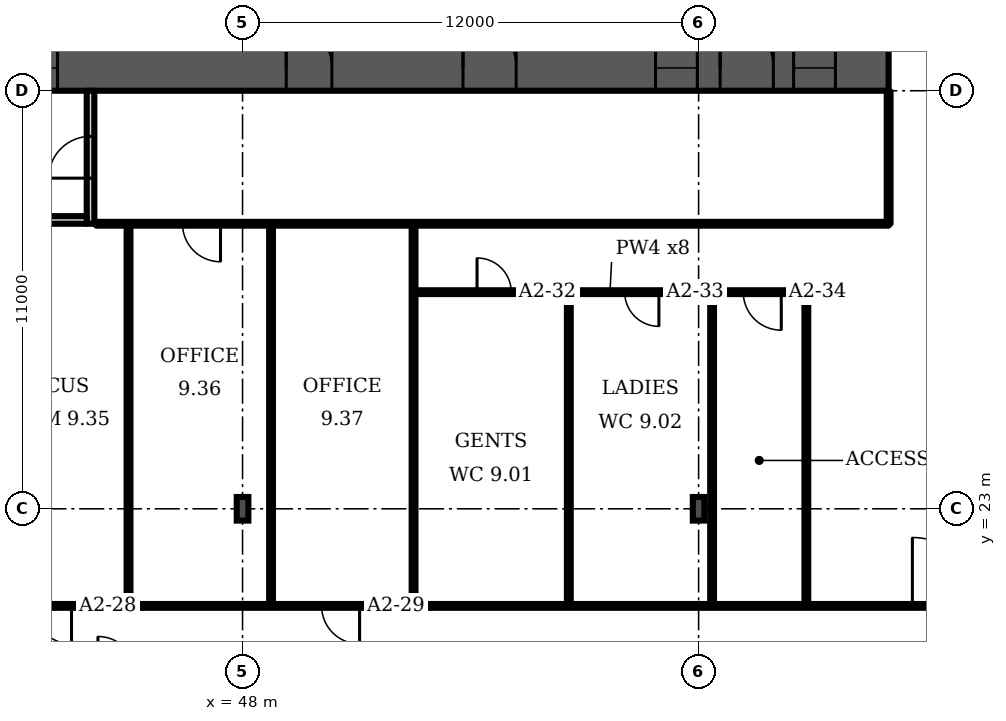
"""IFC4 building model, lengths in metres.
Left out: names, types, materials, properties, quantities, classifications, styles, units other than length and angle.
Written with IfcOpenShell. Run it as: python <this file> out.ifc"""

import sys

from ifc_helpers import new_model, si_unit, direction, frame, frame_2d, origin, origin_2d, place, context, subcontext, project, spatial, rectangle, i_section, extrude, element, fill, save


model = new_model("IFC4")
c1 = context("Model", 3, precision=1e-05, world=origin(), true_north=direction((0.0, 1.0)))
c2 = subcontext(c1, "Body", "Model", "MODEL_VIEW")
j1 = project(units=[si_unit("LENGTHUNIT", "METRE"), si_unit("PLANEANGLEUNIT", "RADIAN")], contexts=[c1])
p1 = place(None, origin())
s1 = spatial("IfcSite", under=j1, at=p1, CompositionType="ELEMENT")
p2 = place(p1, origin())
s2 = spatial("IfcBuilding", under=s1, at=p2, CompositionType="ELEMENT")
p3 = place(p2, frame((0.0, 0.0, 52.3)))
s3 = spatial("IfcBuildingStorey", under=s2, at=p3, CompositionType="ELEMENT", Elevation=52.3)
p4 = place(p3, frame((9.0, 34.6, 0.0), z_axis=(0.0, 0.0, 1.0), x_axis=(1.0, 0.0, 0.0)))
e1 = element("IfcWall", 1, at=p4, inside=s3, PredefinedType="SHEAR", context=c2, shape_type="SweptSolid", body=[
    extrude(rectangle(XDim=56.0, YDim=1.2, at=frame_2d((28.0, 0.0))), origin(), (0.0, 0.0, 1.0), 3.6),
])
p5 = place(p4, frame((2.0, 0.0, 0.0)))
e2 = element("IfcOpeningElement", 2, at=p5, cuts=e1, PredefinedType="OPENING", context=c2, shape_type="SweptSolid", body=[
    extrude(rectangle(XDim=1.0, YDim=2.1, at=frame_2d((0.5, 1.05))), frame((0.0, 0.61, 0.0), z_axis=(0.0, -1.0, 0.0), x_axis=(1.0, 0.0, 0.0)), (0.0, 0.0, 1.0), 1.22),
])
p6 = place(p4, frame((4.6, 0.0, 0.0)))
e3 = element("IfcOpeningElement", 3, at=p6, cuts=e1, PredefinedType="OPENING", context=c2, shape_type="SweptSolid", body=[
    extrude(rectangle(XDim=1.0, YDim=2.1, at=frame_2d((0.5, 1.05))), frame((0.0, 0.61, 0.0), z_axis=(0.0, -1.0, 0.0), x_axis=(1.0, 0.0, 0.0)), (0.0, 0.0, 1.0), 1.22),
])
p7 = place(p4, frame((7.867, 0.0, 0.0)))
e4 = element("IfcOpeningElement", 4, at=p7, cuts=e1, PredefinedType="OPENING", context=c2, shape_type="SweptSolid", body=[
    extrude(rectangle(XDim=1.1, YDim=2.1, at=frame_2d((0.55, 1.05))), frame((0.0, 0.61, 0.0), z_axis=(0.0, -1.0, 0.0), x_axis=(1.0, 0.0, 0.0)), (0.0, 0.0, 1.0), 1.22),
])
p8 = place(p4, frame((12.033, 0.0, 0.0)))
e5 = element("IfcOpeningElement", 5, at=p8, cuts=e1, PredefinedType="OPENING", context=c2, shape_type="SweptSolid", body=[
    extrude(rectangle(XDim=1.1, YDim=2.1, at=frame_2d((0.55, 1.05))), frame((0.0, 0.61, 0.0), z_axis=(0.0, -1.0, 0.0), x_axis=(1.0, 0.0, 0.0)), (0.0, 0.0, 1.0), 1.22),
])
p9 = place(p4, frame((9.8, 0.0, 0.0)))
e6 = element("IfcOpeningElement", 6, at=p9, cuts=e1, PredefinedType="OPENING", context=c2, shape_type="SweptSolid", body=[
    extrude(rectangle(XDim=1.4, YDim=2.1, at=frame_2d((0.7, 1.05))), frame((0.0, 0.61, 0.0), z_axis=(0.0, -1.0, 0.0), x_axis=(1.0, 0.0, 0.0)), (0.0, 0.0, 1.0), 1.22),
])
p10 = place(p4, frame((14.65, 0.0, 0.0)))
e7 = element("IfcOpeningElement", 7, at=p10, cuts=e1, PredefinedType="OPENING", context=c2, shape_type="SweptSolid", body=[
    extrude(rectangle(XDim=1.2, YDim=2.1, at=frame_2d((0.6, 1.05))), frame((0.0, 0.61, 0.0), z_axis=(0.0, -1.0, 0.0), x_axis=(1.0, 0.0, 0.0)), (0.0, 0.0, 1.0), 1.22),
])
p11 = place(p4, frame((21.867, 0.0, 0.0)))
e8 = element("IfcOpeningElement", 8, at=p11, cuts=e1, PredefinedType="OPENING", context=c2, shape_type="SweptSolid", body=[
    extrude(rectangle(XDim=1.1, YDim=2.1, at=frame_2d((0.55, 1.05))), frame((0.0, 0.61, 0.0), z_axis=(0.0, -1.0, 0.0), x_axis=(1.0, 0.0, 0.0)), (0.0, 0.0, 1.0), 1.22),
])
p12 = place(p4, frame((26.033, 0.0, 0.0)))
e9 = element("IfcOpeningElement", 9, at=p12, cuts=e1, PredefinedType="OPENING", context=c2, shape_type="SweptSolid", body=[
    extrude(rectangle(XDim=1.1, YDim=2.1, at=frame_2d((0.55, 1.05))), frame((0.0, 0.61, 0.0), z_axis=(0.0, -1.0, 0.0), x_axis=(1.0, 0.0, 0.0)), (0.0, 0.0, 1.0), 1.22),
])
p13 = place(p4, frame((23.8, 0.0, 0.0)))
e10 = element("IfcOpeningElement", 10, at=p13, cuts=e1, PredefinedType="OPENING", context=c2, shape_type="SweptSolid", body=[
    extrude(rectangle(XDim=1.4, YDim=2.1, at=frame_2d((0.7, 1.05))), frame((0.0, 0.61, 0.0), z_axis=(0.0, -1.0, 0.0), x_axis=(1.0, 0.0, 0.0)), (0.0, 0.0, 1.0), 1.22),
])
p14 = place(p4, frame((28.867, 0.0, 0.0)))
e11 = element("IfcOpeningElement", 11, at=p14, cuts=e1, PredefinedType="OPENING", context=c2, shape_type="SweptSolid", body=[
    extrude(rectangle(XDim=1.1, YDim=2.1, at=frame_2d((0.55, 1.05))), frame((0.0, 0.61, 0.0), z_axis=(0.0, -1.0, 0.0), x_axis=(1.0, 0.0, 0.0)), (0.0, 0.0, 1.0), 1.22),
])
p15 = place(p4, frame((33.033, 0.0, 0.0)))
e12 = element("IfcOpeningElement", 12, at=p15, cuts=e1, PredefinedType="OPENING", context=c2, shape_type="SweptSolid", body=[
    extrude(rectangle(XDim=1.1, YDim=2.1, at=frame_2d((0.55, 1.05))), frame((0.0, 0.61, 0.0), z_axis=(0.0, -1.0, 0.0), x_axis=(1.0, 0.0, 0.0)), (0.0, 0.0, 1.0), 1.22),
])
p16 = place(p4, frame((40.15, 0.0, 0.0)))
e13 = element("IfcOpeningElement", 13, at=p16, cuts=e1, PredefinedType="OPENING", context=c2, shape_type="SweptSolid", body=[
    extrude(rectangle(XDim=1.2, YDim=2.1, at=frame_2d((0.6, 1.05))), frame((0.0, 0.61, 0.0), z_axis=(0.0, -1.0, 0.0), x_axis=(1.0, 0.0, 0.0)), (0.0, 0.0, 1.0), 1.22),
])
p17 = place(p4, frame((44.8, 0.0, 0.0)))
e14 = element("IfcOpeningElement", 14, at=p17, cuts=e1, PredefinedType="OPENING", context=c2, shape_type="SweptSolid", body=[
    extrude(rectangle(XDim=1.4, YDim=2.1, at=frame_2d((0.7, 1.05))), frame((0.0, 0.61, 0.0), z_axis=(0.0, -1.0, 0.0), x_axis=(1.0, 0.0, 0.0)), (0.0, 0.0, 1.0), 1.22),
])
p18 = place(p4, frame((49.867, 0.0, 0.0)))
e15 = element("IfcOpeningElement", 15, at=p18, cuts=e1, PredefinedType="OPENING", context=c2, shape_type="SweptSolid", body=[
    extrude(rectangle(XDim=1.1, YDim=2.1, at=frame_2d((0.55, 1.05))), frame((0.0, 0.61, 0.0), z_axis=(0.0, -1.0, 0.0), x_axis=(1.0, 0.0, 0.0)), (0.0, 0.0, 1.0), 1.22),
])
p19 = place(p4, frame((53.5, 0.0, 0.0)))
e16 = element("IfcOpeningElement", 16, at=p19, cuts=e1, PredefinedType="OPENING", context=c2, shape_type="SweptSolid", body=[
    extrude(rectangle(XDim=1.1, YDim=2.1, at=frame_2d((0.55, 1.05))), frame((0.0, 0.61, 0.0), z_axis=(0.0, -1.0, 0.0), x_axis=(1.0, 0.0, 0.0)), (0.0, 0.0, 1.0), 1.22),
])
p20 = place(p4, frame((51.567, 0.0, 0.0)))
e17 = element("IfcOpeningElement", 17, at=p20, cuts=e1, PredefinedType="OPENING", context=c2, shape_type="SweptSolid", body=[
    extrude(rectangle(XDim=1.4, YDim=2.1, at=frame_2d((0.7, 1.05))), frame((0.0, 0.61, 0.0), z_axis=(0.0, -1.0, 0.0), x_axis=(1.0, 0.0, 0.0)), (0.0, 0.0, 1.0), 1.22),
])
for number, where, z_axis, x_axis in (
    (18, (48.0, 23.0, 0.0), (0.0, 0.0, 1.0), (1.0, 0.0, 0.0)),
    (19, (60.0, 23.0, 0.0), (0.0, 0.0, 1.0), (1.0, 0.0, 0.0)),
):
    element("IfcColumn", number, at=place(p3, frame(where, z_axis=z_axis, x_axis=x_axis)), inside=s3, PredefinedType="COLUMN", context=c2, shape_type="SweptSolid", body=[
        extrude(i_section(OverallWidth=0.305, OverallDepth=0.62, WebThickness=0.021, FlangeThickness=0.04, FilletRadius=0.027, at=origin_2d()), origin(), (0.0, 0.0, 1.0), 3.6),
    ])
p21 = place(p3, frame((44.0, 30.5, 0.0), z_axis=(0.0, 0.0, 1.0), x_axis=(0.0, 1.0, 0.0)))
e20 = element("IfcWall", 20, at=p21, inside=s3, PredefinedType="PARTITIONING", context=c2, shape_type="SweptSolid", body=[
    extrude(rectangle(XDim=3.5, YDim=0.2, at=frame_2d((1.75, 0.0))), origin(), (0.0, 0.0, 1.0), 3.2),
])
p22 = place(p21, frame((1.2, 0.0, 0.0)))
e21 = element("IfcOpeningElement", 21, at=p22, cuts=e20, PredefinedType="OPENING", context=c2, shape_type="SweptSolid", body=[
    extrude(rectangle(XDim=1.1, YDim=2.1, at=frame_2d((0.55, 1.05))), frame((0.0, 0.11, 0.0), z_axis=(0.0, -1.0, 0.0), x_axis=(1.0, 0.0, 0.0)), (0.0, 0.0, 1.0), 0.22),
])
p23 = place(p3, frame((41.1, 30.6, 0.0), z_axis=(0.0, 0.0, 1.0), x_axis=(1.0, 0.0, 0.0)))
e22 = element("IfcWall", 22, at=p23, inside=s3, PredefinedType="PARTITIONING", context=c2, shape_type="SweptSolid", body=[
    extrude(rectangle(XDim=2.8, YDim=0.2, at=frame_2d((1.4, 0.0))), origin(), (0.0, 0.0, 1.0), 3.2),
])
p24 = place(p3, frame((11.505, 20.445, 0.0), z_axis=(0.0, 0.0, 1.0), x_axis=(1.0, 0.0, 0.0)))
e23 = element("IfcWall", 23, at=p24, inside=s3, PredefinedType="PARTITIONING", context=c2, shape_type="SweptSolid", body=[
    extrude(rectangle(XDim=58.82, YDim=0.1, at=frame_2d((29.41, 0.0))), origin(), (0.0, 0.0, 1.0), 3.2),
])
p25 = place(p24, frame((0.21, 0.0, 0.0)))
e24 = element("IfcOpeningElement", 24, at=p25, cuts=e23, PredefinedType="OPENING", context=c2, shape_type="SweptSolid", body=[
    extrude(rectangle(XDim=1.0, YDim=2.1, at=frame_2d((0.5, 1.05))), frame((0.0, 0.06, 0.0), z_axis=(0.0, -1.0, 0.0), x_axis=(1.0, 0.0, 0.0)), (0.0, 0.0, 1.0), 0.12),
])
p26 = place(p24, frame((8.33, 0.0, 0.0)))
e25 = element("IfcOpeningElement", 25, at=p26, cuts=e23, PredefinedType="OPENING", context=c2, shape_type="SweptSolid", body=[
    extrude(rectangle(XDim=1.0, YDim=2.1, at=frame_2d((0.5, 1.05))), frame((0.0, 0.06, 0.0), z_axis=(0.0, -1.0, 0.0), x_axis=(1.0, 0.0, 0.0)), (0.0, 0.0, 1.0), 0.12),
])
p27 = place(p24, frame((22.795, 0.0, 0.0)))
e26 = element("IfcOpeningElement", 26, at=p27, cuts=e23, PredefinedType="OPENING", context=c2, shape_type="SweptSolid", body=[
    extrude(rectangle(XDim=1.0, YDim=2.1, at=frame_2d((0.5, 1.05))), frame((0.0, 0.06, 0.0), z_axis=(0.0, -1.0, 0.0), x_axis=(1.0, 0.0, 0.0)), (0.0, 0.0, 1.0), 0.12),
])
p28 = place(p24, frame((26.995, 0.0, 0.0)))
e27 = element("IfcOpeningElement", 27, at=p28, cuts=e23, PredefinedType="OPENING", context=c2, shape_type="SweptSolid", body=[
    extrude(rectangle(XDim=1.0, YDim=2.1, at=frame_2d((0.5, 1.05))), frame((0.0, 0.06, 0.0), z_axis=(0.0, -1.0, 0.0), x_axis=(1.0, 0.0, 0.0)), (0.0, 0.0, 1.0), 0.12),
])
p29 = place(p24, frame((30.995, 0.0, 0.0)))
e28 = element("IfcOpeningElement", 28, at=p29, cuts=e23, PredefinedType="OPENING", context=c2, shape_type="SweptSolid", body=[
    extrude(rectangle(XDim=1.0, YDim=2.1, at=frame_2d((0.5, 1.05))), frame((0.0, 0.06, 0.0), z_axis=(0.0, -1.0, 0.0), x_axis=(1.0, 0.0, 0.0)), (0.0, 0.0, 1.0), 0.12),
])
p30 = place(p24, frame((38.575, 0.0, 0.0)))
e29 = element("IfcOpeningElement", 29, at=p30, cuts=e23, PredefinedType="OPENING", context=c2, shape_type="SweptSolid", body=[
    extrude(rectangle(XDim=1.0, YDim=2.1, at=frame_2d((0.5, 1.05))), frame((0.0, 0.06, 0.0), z_axis=(0.0, -1.0, 0.0), x_axis=(1.0, 0.0, 0.0)), (0.0, 0.0, 1.0), 0.12),
])
p31 = place(p24, frame((54.12, 0.0, 0.0)))
e30 = element("IfcOpeningElement", 30, at=p31, cuts=e23, PredefinedType="OPENING", context=c2, shape_type="SweptSolid", body=[
    extrude(rectangle(XDim=1.8, YDim=2.1, at=frame_2d((0.9, 1.05))), frame((0.0, 0.06, 0.0), z_axis=(0.0, -1.0, 0.0), x_axis=(1.0, 0.0, 0.0)), (0.0, 0.0, 1.0), 0.12),
])
for number, where, z_axis, x_axis in (
    (31, (45.0, 20.445, 0.0), (0.0, 0.0, 1.0), (0.0, 1.0, 0.0)),
    (32, (48.75, 20.445, 0.0), (0.0, 0.0, 1.0), (0.0, 1.0, 0.0)),
):
    element("IfcWall", number, at=place(p3, frame(where, z_axis=z_axis, x_axis=x_axis)), inside=s3, PredefinedType="PARTITIONING", context=c2, shape_type="SweptSolid", body=[
        extrude(rectangle(XDim=10.055, YDim=0.1, at=frame_2d((5.027, 0.0))), origin(), (0.0, 0.0, 1.0), 3.2),
    ])
p32 = place(p3, frame((52.5, 20.445, 0.0), z_axis=(0.0, 0.0, 1.0), x_axis=(0.0, 1.0, 0.0)))
e33 = element("IfcWall", 33, at=p32, inside=s3, PredefinedType="PARTITIONING", context=c2, shape_type="SweptSolid", body=[
    extrude(rectangle(XDim=10.045, YDim=0.1, at=frame_2d((5.022, 0.0))), origin(), (0.0, 0.0, 1.0), 3.2),
])
p33 = place(p3, frame((52.5, 28.7, 0.0), z_axis=(0.0, 0.0, 1.0), x_axis=(1.0, 0.0, 0.0)))
e34 = element("IfcWall", 34, at=p33, inside=s3, PredefinedType="PARTITIONING", context=c2, shape_type="SweptSolid", body=[
    extrude(rectangle(XDim=10.335, YDim=0.1, at=frame_2d((5.167, 0.0))), origin(), (0.0, 0.0, 1.0), 3.2),
])
p34 = place(p33, frame((1.67, 0.0, 0.0)))
e35 = element("IfcOpeningElement", 35, at=p34, cuts=e34, PredefinedType="OPENING", context=c2, shape_type="SweptSolid", body=[
    extrude(rectangle(XDim=0.9, YDim=2.1, at=frame_2d((0.45, 1.05))), frame((0.0, 0.06, 0.0), z_axis=(0.0, -1.0, 0.0), x_axis=(1.0, 0.0, 0.0)), (0.0, 0.0, 1.0), 0.12),
])
p35 = place(p33, frame((5.555, 0.0, 0.0)))
e36 = element("IfcOpeningElement", 36, at=p35, cuts=e34, PredefinedType="OPENING", context=c2, shape_type="SweptSolid", body=[
    extrude(rectangle(XDim=0.9, YDim=2.1, at=frame_2d((0.45, 1.05))), frame((0.0, 0.06, 0.0), z_axis=(0.0, -1.0, 0.0), x_axis=(1.0, 0.0, 0.0)), (0.0, 0.0, 1.0), 0.12),
])
p36 = place(p33, frame((8.675, 0.0, 0.0)))
e37 = element("IfcOpeningElement", 37, at=p36, cuts=e34, PredefinedType="OPENING", context=c2, shape_type="SweptSolid", body=[
    extrude(rectangle(XDim=1.0, YDim=2.1, at=frame_2d((0.5, 1.05))), frame((0.0, 0.06, 0.0), z_axis=(0.0, -1.0, 0.0), x_axis=(1.0, 0.0, 0.0)), (0.0, 0.0, 1.0), 0.12),
])
for number, where, z_axis, x_axis in (
    (38, (56.585, 20.445, 0.0), (0.0, 0.0, 1.0), (0.0, 1.0, 0.0)),
    (39, (60.355, 20.445, 0.0), (0.0, 0.0, 1.0), (0.0, 1.0, 0.0)),
    (40, (62.835, 20.445, 0.0), (0.0, 0.0, 1.0), (0.0, 1.0, 0.0)),
):
    element("IfcWall", number, at=place(p3, frame(where, z_axis=z_axis, x_axis=x_axis)), inside=s3, PredefinedType="PARTITIONING", context=c2, shape_type="SweptSolid", body=[
        extrude(rectangle(XDim=8.255, YDim=0.1, at=frame_2d((4.127, 0.0))), origin(), (0.0, 0.0, 1.0), 3.2),
    ])
p37 = place(p3, frame((65.0, 30.5, 0.0), z_axis=(0.0, 0.0, 1.0), x_axis=(0.0, 1.0, 0.0)))
e41 = element("IfcWall", 41, at=p37, inside=s3, PredefinedType="PARTITIONING", context=c2, shape_type="SweptSolid", body=[
    extrude(rectangle(XDim=3.48, YDim=0.1, at=frame_2d((1.74, 0.0))), origin(), (0.0, 0.0, 1.0), 3.2),
])
p38 = place(p3, frame((44.15, 30.5, 0.0), z_axis=(0.0, 0.0, 1.0), x_axis=(1.0, 0.0, 0.0)))
e42 = element("IfcWall", 42, at=p38, inside=s3, PredefinedType="PARTITIONING", context=c2, shape_type="SweptSolid", body=[
    extrude(rectangle(XDim=20.85, YDim=0.1, at=frame_2d((10.425, 0.0))), origin(), (0.0, 0.0, 1.0), 3.2),
])
p39 = place(p38, frame((2.27, 0.0, 0.0)))
e43 = element("IfcOpeningElement", 43, at=p39, cuts=e42, PredefinedType="OPENING", context=c2, shape_type="SweptSolid", body=[
    extrude(rectangle(XDim=1.0, YDim=2.1, at=frame_2d((0.5, 1.05))), frame((0.0, 0.06, 0.0), z_axis=(0.0, -1.0, 0.0), x_axis=(1.0, 0.0, 0.0)), (0.0, 0.0, 1.0), 0.12),
])
p40 = place(p15, origin())
e44 = element("IfcDoor", 44, at=p40, inside=s3, OperationType="DOUBLE_DOOR_SLIDING", PredefinedType="DOOR", context=c2, shape_type="SweptSolid", body=[
    extrude(rectangle(XDim=1.1, YDim=2.1, at=frame_2d((0.55, 1.05))), frame((0.0, 0.025, 0.0), z_axis=(0.0, -1.0, 0.0), x_axis=(1.0, 0.0, 0.0)), (0.0, 0.0, 1.0), 0.05),
])
fill(e12, e44)
p41 = place(p16, origin())
e45 = element("IfcDoor", 45, at=p41, inside=s3, OperationType="SINGLE_SWING_LEFT", PredefinedType="DOOR", context=c2, shape_type="SweptSolid", body=[
    extrude(rectangle(XDim=1.2, YDim=2.1, at=frame_2d((0.6, 1.05))), frame((0.0, 0.025, 0.0), z_axis=(0.0, -1.0, 0.0), x_axis=(1.0, 0.0, 0.0)), (0.0, 0.0, 1.0), 0.05),
])
fill(e13, e45)
p42 = place(p17, origin())
e46 = element("IfcDoor", 46, at=p42, inside=s3, OperationType="DOUBLE_DOOR_SINGLE_SWING", PredefinedType="DOOR", context=c2, shape_type="SweptSolid", body=[
    extrude(rectangle(XDim=1.4, YDim=2.1, at=frame_2d((0.7, 1.05))), frame((0.0, 0.025, 0.0), z_axis=(0.0, -1.0, 0.0), x_axis=(1.0, 0.0, 0.0)), (0.0, 0.0, 1.0), 0.05),
])
fill(e14, e46)
p43 = place(p18, origin())
e47 = element("IfcDoor", 47, at=p43, inside=s3, OperationType="DOUBLE_DOOR_SLIDING", PredefinedType="DOOR", context=c2, shape_type="SweptSolid", body=[
    extrude(rectangle(XDim=1.1, YDim=2.1, at=frame_2d((0.55, 1.05))), frame((0.0, 0.025, 0.0), z_axis=(0.0, -1.0, 0.0), x_axis=(1.0, 0.0, 0.0)), (0.0, 0.0, 1.0), 0.05),
])
fill(e15, e47)
p44 = place(p19, origin())
e48 = element("IfcDoor", 48, at=p44, inside=s3, OperationType="DOUBLE_DOOR_SLIDING", PredefinedType="DOOR", context=c2, shape_type="SweptSolid", body=[
    extrude(rectangle(XDim=1.1, YDim=2.1, at=frame_2d((0.55, 1.05))), frame((0.0, 0.025, 0.0), z_axis=(0.0, -1.0, 0.0), x_axis=(1.0, 0.0, 0.0)), (0.0, 0.0, 1.0), 0.05),
])
fill(e16, e48)
p45 = place(p20, origin())
e49 = element("IfcDoor", 49, at=p45, inside=s3, OperationType="DOUBLE_DOOR_SINGLE_SWING", PredefinedType="DOOR", context=c2, shape_type="SweptSolid", body=[
    extrude(rectangle(XDim=1.4, YDim=2.1, at=frame_2d((0.7, 1.05))), frame((0.0, 0.025, 0.0), z_axis=(0.0, -1.0, 0.0), x_axis=(1.0, 0.0, 0.0)), (0.0, 0.0, 1.0), 0.05),
])
fill(e17, e49)
p46 = place(p22, origin())
e50 = element("IfcDoor", 50, at=p46, inside=s3, OperationType="SINGLE_SWING_LEFT", PredefinedType="DOOR", context=c2, shape_type="SweptSolid", body=[
    extrude(rectangle(XDim=1.1, YDim=2.1, at=frame_2d((0.55, 1.05))), frame((0.0, 0.025, 0.0), z_axis=(0.0, -1.0, 0.0), x_axis=(1.0, 0.0, 0.0)), (0.0, 0.0, 1.0), 0.05),
])
fill(e21, e50)
p47 = place(p29, origin())
e51 = element("IfcDoor", 51, at=p47, inside=s3, OperationType="SINGLE_SWING_RIGHT", PredefinedType="DOOR", context=c2, shape_type="SweptSolid", body=[
    extrude(rectangle(XDim=1.0, YDim=2.1, at=frame_2d((0.5, 1.05))), frame((0.0, 0.025, 0.0), z_axis=(0.0, -1.0, 0.0), x_axis=(1.0, 0.0, 0.0)), (0.0, 0.0, 1.0), 0.05),
])
fill(e28, e51)
p48 = place(p30, origin())
e52 = element("IfcDoor", 52, at=p48, inside=s3, OperationType="SINGLE_SWING_RIGHT", PredefinedType="DOOR", context=c2, shape_type="SweptSolid", body=[
    extrude(rectangle(XDim=1.0, YDim=2.1, at=frame_2d((0.5, 1.05))), frame((0.0, 0.025, 0.0), z_axis=(0.0, -1.0, 0.0), x_axis=(1.0, 0.0, 0.0)), (0.0, 0.0, 1.0), 0.05),
])
fill(e29, e52)
p49 = place(p31, origin())
e53 = element("IfcDoor", 53, at=p49, inside=s3, OperationType="DOUBLE_DOOR_SINGLE_SWING", PredefinedType="DOOR", context=c2, shape_type="SweptSolid", body=[
    extrude(rectangle(XDim=1.8, YDim=2.1, at=frame_2d((0.9, 1.05))), frame((0.0, 0.025, 0.0), z_axis=(0.0, -1.0, 0.0), x_axis=(1.0, 0.0, 0.0)), (0.0, 0.0, 1.0), 0.05),
])
fill(e30, e53)
p50 = place(p34, origin())
e54 = element("IfcDoor", 54, at=p50, inside=s3, OperationType="SINGLE_SWING_LEFT", PredefinedType="DOOR", context=c2, shape_type="SweptSolid", body=[
    extrude(rectangle(XDim=0.9, YDim=2.1, at=frame_2d((0.45, 1.05))), frame((0.0, 0.025, 0.0), z_axis=(0.0, -1.0, 0.0), x_axis=(1.0, 0.0, 0.0)), (0.0, 0.0, 1.0), 0.05),
])
fill(e35, e54)
p51 = place(p35, origin())
e55 = element("IfcDoor", 55, at=p51, inside=s3, OperationType="SINGLE_SWING_RIGHT", PredefinedType="DOOR", context=c2, shape_type="SweptSolid", body=[
    extrude(rectangle(XDim=0.9, YDim=2.1, at=frame_2d((0.45, 1.05))), frame((0.0, 0.025, 0.0), z_axis=(0.0, -1.0, 0.0), x_axis=(1.0, 0.0, 0.0)), (0.0, 0.0, 1.0), 0.05),
])
fill(e36, e55)
p52 = place(p36, origin())
e56 = element("IfcDoor", 56, at=p52, inside=s3, OperationType="SINGLE_SWING_RIGHT", PredefinedType="DOOR", context=c2, shape_type="SweptSolid", body=[
    extrude(rectangle(XDim=1.0, YDim=2.1, at=frame_2d((0.5, 1.05))), frame((0.0, 0.025, 0.0), z_axis=(0.0, -1.0, 0.0), x_axis=(1.0, 0.0, 0.0)), (0.0, 0.0, 1.0), 0.05),
])
fill(e37, e56)
p53 = place(p39, origin())
e57 = element("IfcDoor", 57, at=p53, inside=s3, OperationType="SINGLE_SWING_RIGHT", PredefinedType="DOOR", context=c2, shape_type="SweptSolid", body=[
    extrude(rectangle(XDim=1.0, YDim=2.1, at=frame_2d((0.5, 1.05))), frame((0.0, 0.025, 0.0), z_axis=(0.0, -1.0, 0.0), x_axis=(1.0, 0.0, 0.0)), (0.0, 0.0, 1.0), 0.05),
])
fill(e43, e57)
save(model, sys.argv[1])
